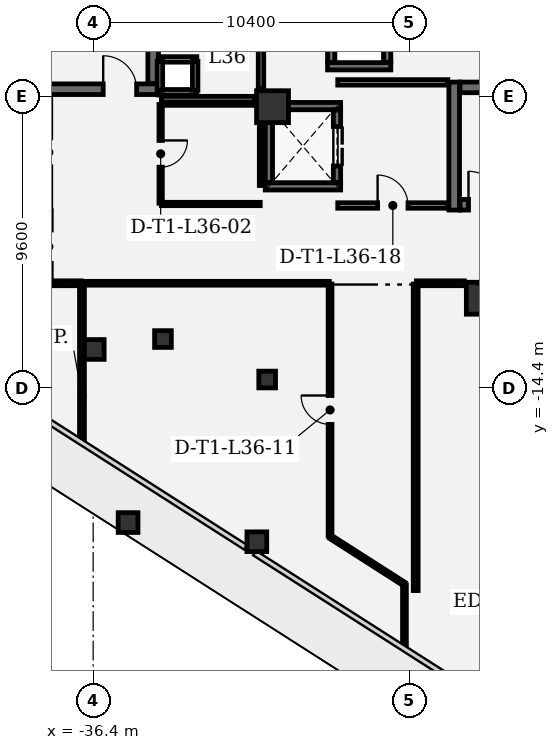
"""IFC4 building model, lengths in metres.
Left out: names, types, materials, properties, quantities, classifications, styles, units other than length and angle.
Written with IfcOpenShell. Run it as: python <this file> out.ifc"""

import sys

from ifc_helpers import new_model, si_unit, direction, frame, frame_2d, origin, origin_2d, place, context, subcontext, project, spatial, rectangle, extrude, element, fill, save


model = new_model("IFC4")
c1 = context("Model", 3, precision=1e-05, world=origin(), true_north=direction((0.0, 1.0)))
c2 = subcontext(c1, "Body", "Model", "MODEL_VIEW")
j1 = project(units=[si_unit("LENGTHUNIT", "METRE"), si_unit("PLANEANGLEUNIT", "RADIAN")], contexts=[c1])
p1 = place(None, origin())
s1 = spatial("IfcSite", under=j1, at=p1, CompositionType="ELEMENT")
p2 = place(p1, origin())
s2 = spatial("IfcBuilding", under=s1, at=p2, CompositionType="ELEMENT")
p3 = place(p2, frame((0.0, 0.0, 158.4)))
s3 = spatial("IfcBuildingStorey", under=s2, at=p3, CompositionType="ELEMENT", Elevation=158.4)
for number, where, z_axis, x_axis in (
    (1, (-23.6, -11.45, 0.0), (0.0, 0.0, 1.0), (1.0, 0.0, 0.0)),
    (2, (-30.5, -5.15, 0.0), (0.0, 0.0, 1.0), (1.0, 0.0, 0.0)),
):
    element("IfcColumn", number, at=place(p3, frame(where, z_axis=z_axis, x_axis=x_axis)), inside=s3, PredefinedType="COLUMN", context=c2, shape_type="SweptSolid", body=[
        extrude(rectangle(XDim=1.05, YDim=1.05, at=origin_2d()), origin(), (0.0, 0.0, 1.0), 4.05),
    ])
for number, where, z_axis, x_axis in (
    (3, (-35.252, -18.829, 0.0), (0.0, 0.0, 1.0), (1.0, 0.0, 0.0)),
    (4, (-31.016, -19.46, 0.0), (0.0, 0.0, 1.0), (1.0, 0.0, 0.0)),
    (5, (-36.365, -13.135, 0.0), (0.0, 0.0, 1.0), (1.0, 0.0, 0.0)),
):
    element("IfcColumn", number, at=place(p3, frame(where, z_axis=z_axis, x_axis=x_axis)), inside=s3, PredefinedType="COLUMN", context=c2, shape_type="SweptSolid", body=[
        extrude(rectangle(XDim=0.65, YDim=0.65, at=origin_2d()), origin(), (0.0, 0.0, 1.0), 4.05),
    ])
for number, where, z_axis, x_axis in (
    (6, (-34.104, -12.792, 0.0), (0.0, 0.0, 1.0), (1.0, 0.0, 0.0)),
    (7, (-30.677, -14.124, 0.0), (0.0, 0.0, 1.0), (1.0, 0.0, 0.0)),
):
    element("IfcColumn", number, at=place(p3, frame(where, z_axis=z_axis, x_axis=x_axis)), inside=s3, PredefinedType="COLUMN", context=c2, shape_type="SweptSolid", body=[
        extrude(rectangle(XDim=0.55, YDim=0.55, at=origin_2d()), origin(), (0.0, 0.0, 1.0), 4.05),
    ])
p4 = place(p3, frame((-24.525, -4.34, 0.0), z_axis=(0.0, 0.0, 1.0), x_axis=(0.0, -1.0, 0.0)))
e8 = element("IfcWall", 8, at=p4, inside=s3, PredefinedType="SHEAR", context=c2, shape_type="SweptSolid", body=[
    extrude(rectangle(XDim=4.21, YDim=0.35, at=frame_2d((2.105, 0.0))), origin(), (0.0, 0.0, 1.0), 3.78),
])
p5 = place(p3, frame((-24.335, -8.375, 0.0), z_axis=(0.0, 0.0, 1.0), x_axis=(1.0, 0.0, 0.0)))
e9 = element("IfcWall", 9, at=p5, inside=s3, PredefinedType="SHEAR", context=c2, shape_type="SweptSolid", body=[
    extrude(rectangle(XDim=8.12, YDim=0.35, at=frame_2d((4.06, 0.0))), origin(), (0.0, 0.0, 1.0), 3.78),
])
p6 = place(p5, frame((0.28, 0.0, 0.0)))
e10 = element("IfcOpeningElement", 10, at=p6, cuts=e9, PredefinedType="OPENING", context=c2, shape_type="SweptSolid", body=[
    extrude(rectangle(XDim=1.1, YDim=2.2, at=frame_2d((0.55, 1.1))), frame((0.0, 0.185, 0.0), z_axis=(0.0, -1.0, 0.0), x_axis=(1.0, 0.0, 0.0)), (0.0, 0.0, 1.0), 0.37),
])
p7 = place(p3, frame((-16.215, -4.515, 0.0), z_axis=(0.0, 0.0, 1.0), x_axis=(-1.0, 0.0, 0.0)))
e11 = element("IfcWall", 11, at=p7, inside=s3, PredefinedType="SHEAR", context=c2, shape_type="SweptSolid", body=[
    extrude(rectangle(XDim=8.12, YDim=0.35, at=frame_2d((4.06, 0.0))), origin(), (0.0, 0.0, 1.0), 3.78),
])
p8 = place(p3, frame((-38.46, -4.575, 0.0), z_axis=(0.0, 0.0, 1.0), x_axis=(1.0, 0.0, 0.0)))
e12 = element("IfcWall", 12, at=p8, inside=s3, PredefinedType="SHEAR", context=c2, shape_type="SweptSolid", body=[
    extrude(rectangle(XDim=4.21, YDim=0.35, at=frame_2d((2.105, 0.0))), origin(), (0.0, 0.0, 1.0), 3.78),
])
p9 = place(p8, frame((2.39, 0.0, 0.0)))
e13 = element("IfcOpeningElement", 13, at=p9, cuts=e12, PredefinedType="OPENING", context=c2, shape_type="SweptSolid", body=[
    extrude(rectangle(XDim=1.1, YDim=2.2, at=frame_2d((0.55, 1.1))), frame((0.0, 0.185, 0.0), z_axis=(0.0, -1.0, 0.0), x_axis=(1.0, 0.0, 0.0)), (0.0, 0.0, 1.0), 0.37),
])
p10 = place(p3, frame((-34.425, -4.385, 0.0), z_axis=(0.0, 0.0, 1.0), x_axis=(0.0, 1.0, 0.0)))
e14 = element("IfcWall", 14, at=p10, inside=s3, PredefinedType="SHEAR", context=c2, shape_type="SweptSolid", body=[
    extrude(rectangle(XDim=8.77, YDim=0.35, at=frame_2d((4.385, 0.0))), origin(), (0.0, 0.0, 1.0), 3.78),
])
for number, where, z_axis, x_axis in (
    (15, (-28.26, -7.77, 0.0), (0.0, 0.0, 1.0), (-1.0, 0.0, 0.0)),
    (16, (-30.74, -5.13, 0.0), (0.0, 0.0, 1.0), (1.0, 0.0, 0.0)),
):
    element("IfcWall", number, at=place(p3, frame(where, z_axis=z_axis, x_axis=x_axis)), inside=s3, PredefinedType="SHEAR", context=c2, shape_type="SweptSolid", body=[
        extrude(rectangle(XDim=2.48, YDim=0.24, at=frame_2d((1.24, 0.0))), origin(), (0.0, 0.0, 1.0), 3.78),
    ])
p11 = place(p3, frame((-30.62, -7.638, 0.0), z_axis=(0.0, 0.0, 1.0), x_axis=(0.0, 1.0, 0.0)))
e17 = element("IfcWall", 17, at=p11, inside=s3, PredefinedType="SHEAR", context=c2, shape_type="SweptSolid", body=[
    extrude(rectangle(XDim=2.376, YDim=0.24, at=frame_2d((1.188, 0.0))), origin(), (0.0, 0.0, 1.0), 3.78),
])
p12 = place(p3, frame((-28.38, -5.262, 0.0), z_axis=(0.0, 0.0, 1.0), x_axis=(0.0, -1.0, 0.0)))
e18 = element("IfcWall", 18, at=p12, inside=s3, PredefinedType="SHEAR", context=c2, shape_type="SweptSolid", body=[
    extrude(rectangle(XDim=2.376, YDim=0.24, at=frame_2d((1.188, 0.0))), origin(), (0.0, 0.0, 1.0), 3.78),
])
p13 = place(p12, frame((0.538, 0.0, 0.0)))
e19 = element("IfcOpeningElement", 19, at=p13, cuts=e18, PredefinedType="OPENING", context=c2, shape_type="SweptSolid", body=[
    extrude(rectangle(XDim=1.3, YDim=2.3, at=frame_2d((0.65, 1.15))), frame((0.0, 0.13, 0.0), z_axis=(0.0, -1.0, 0.0), x_axis=(1.0, 0.0, 0.0)), (0.0, 0.0, 1.0), 0.26),
])
p14 = place(p3, frame((-26.61, -3.82, 0.0), z_axis=(0.0, 0.0, 1.0), x_axis=(-1.0, 0.0, 0.0)))
e20 = element("IfcWall", 20, at=p14, inside=s3, PredefinedType="SHEAR", context=c2, shape_type="SweptSolid", body=[
    extrude(rectangle(XDim=2.08, YDim=0.24, at=frame_2d((1.04, 0.0))), origin(), (0.0, 0.0, 1.0), 3.78),
])
for number, where, z_axis, x_axis in (
    (21, (-28.57, -3.688, 0.0), (0.0, 0.0, 1.0), (0.0, 1.0, 0.0)),
    (22, (-26.73, -1.562, 0.0), (0.0, 0.0, 1.0), (0.0, -1.0, 0.0)),
):
    element("IfcWall", number, at=place(p3, frame(where, z_axis=z_axis, x_axis=x_axis)), inside=s3, PredefinedType="SHEAR", context=c2, shape_type="SweptSolid", body=[
        extrude(rectangle(XDim=2.126, YDim=0.24, at=frame_2d((1.063, 0.0))), origin(), (0.0, 0.0, 1.0), 3.78),
    ])
for number, where, z_axis, x_axis in (
    (23, (-32.99, -4.675, 0.0), (0.0, 0.0, 1.0), (-1.0, 0.0, 0.0)),
    (24, (-34.26, -3.595, 0.0), (0.0, 0.0, 1.0), (1.0, 0.0, 0.0)),
):
    element("IfcWall", number, at=place(p3, frame(where, z_axis=z_axis, x_axis=x_axis)), inside=s3, PredefinedType="PARTITIONING", context=c2, shape_type="SweptSolid", body=[
        extrude(rectangle(XDim=1.27, YDim=0.18, at=frame_2d((0.635, 0.0))), origin(), (0.0, 0.0, 1.0), 3.78),
    ])
for number, where, z_axis, x_axis in (
    (25, (-34.205, -4.61, 0.0), (0.0, 0.0, 1.0), (0.0, 1.0, 0.0)),
    (26, (-33.045, -3.66, 0.0), (0.0, 0.0, 1.0), (0.0, -1.0, 0.0)),
):
    element("IfcWall", number, at=place(p3, frame(where, z_axis=z_axis, x_axis=x_axis)), inside=s3, PredefinedType="PARTITIONING", context=c2, shape_type="SweptSolid", body=[
        extrude(rectangle(XDim=0.95, YDim=0.18, at=frame_2d((0.475, 0.0))), origin(), (0.0, 0.0, 1.0), 3.78),
    ])
p15 = place(p3, frame((-28.355, -8.4, 0.0), z_axis=(0.0, 0.0, 1.0), x_axis=(1.0, 0.0, 0.0)))
e27 = element("IfcWall", 27, at=p15, inside=s3, PredefinedType="PARTITIONING", context=c2, shape_type="SweptSolid", body=[
    extrude(rectangle(XDim=3.622, YDim=0.18, at=frame_2d((1.811, 0.0))), origin(), (0.0, 0.0, 1.0), 3.78),
])
p16 = place(p15, frame((1.311, 0.0, 0.0)))
e28 = element("IfcOpeningElement", 28, at=p16, cuts=e27, PredefinedType="OPENING", context=c2, shape_type="SweptSolid", body=[
    extrude(rectangle(XDim=1.0, YDim=2.15, at=frame_2d((0.5, 1.075))), frame((0.0, 0.1, 0.0), z_axis=(0.0, -1.0, 0.0), x_axis=(1.0, 0.0, 0.0)), (0.0, 0.0, 1.0), 0.2),
])
p17 = place(p3, frame((-24.733, -4.35, 0.0), z_axis=(0.0, 0.0, 1.0), x_axis=(-1.0, 0.0, 0.0)))
e29 = element("IfcWall", 29, at=p17, inside=s3, PredefinedType="PARTITIONING", context=c2, shape_type="SweptSolid", body=[
    extrude(rectangle(XDim=3.622, YDim=0.18, at=frame_2d((1.811, 0.0))), origin(), (0.0, 0.0, 1.0), 3.78),
])
p18 = place(p3, frame((-34.155, -8.35, 0.0), z_axis=(0.0, 0.0, 1.0), x_axis=(1.0, 0.0, 0.0)))
e30 = element("IfcWall", 30, at=p18, inside=s3, PredefinedType="PARTITIONING", context=c2, shape_type="SweptSolid", body=[
    extrude(rectangle(XDim=3.25, YDim=0.11, at=frame_2d((1.625, 0.0))), origin(), (0.0, 0.0, 1.0), 3.78),
])
p19 = place(p3, frame((-30.88, -7.743, 0.0), z_axis=(0.0, 0.0, 1.0), x_axis=(0.0, 1.0, 0.0)))
e31 = element("IfcWall", 31, at=p19, inside=s3, PredefinedType="PARTITIONING", context=c2, shape_type="SweptSolid", body=[
    extrude(rectangle(XDim=2.003, YDim=0.11, at=frame_2d((1.001, 0.0))), origin(), (0.0, 0.0, 1.0), 3.78),
])
p20 = place(p3, frame((-31.09, -5.05, 0.0), z_axis=(0.0, 0.0, 1.0), x_axis=(-1.0, 0.0, 0.0)))
e32 = element("IfcWall", 32, at=p20, inside=s3, PredefinedType="PARTITIONING", context=c2, shape_type="SweptSolid", body=[
    extrude(rectangle(XDim=3.065, YDim=0.11, at=frame_2d((1.532, 0.0))), origin(), (0.0, 0.0, 1.0), 3.78),
])
p21 = place(p3, frame((-34.18, -5.075, 0.0), z_axis=(0.0, 0.0, 1.0), x_axis=(0.0, -1.0, 0.0)))
e33 = element("IfcWall", 33, at=p21, inside=s3, PredefinedType="PARTITIONING", context=c2, shape_type="SweptSolid", body=[
    extrude(rectangle(XDim=3.25, YDim=0.11, at=frame_2d((1.625, 0.0))), origin(), (0.0, 0.0, 1.0), 3.78),
])
p22 = place(p21, frame((1.185, 0.0, 0.0)))
e34 = element("IfcOpeningElement", 34, at=p22, cuts=e33, PredefinedType="OPENING", context=c2, shape_type="SweptSolid", body=[
    extrude(rectangle(XDim=0.88, YDim=2.1, at=frame_2d((0.44, 1.05))), frame((0.0, 0.065, 0.0), z_axis=(0.0, -1.0, 0.0), x_axis=(1.0, 0.0, 0.0)), (0.0, 0.0, 1.0), 0.13),
])
p23 = place(p3, frame((-34.155, -4.9, 0.0), z_axis=(0.0, 0.0, 1.0), x_axis=(1.0, 0.0, 0.0)))
e35 = element("IfcWall", 35, at=p23, inside=s3, PredefinedType="PARTITIONING", context=c2, shape_type="SweptSolid", body=[
    extrude(rectangle(XDim=3.065, YDim=0.18, at=frame_2d((1.532, 0.0))), origin(), (0.0, 0.0, 1.0), 3.78),
])
p24 = place(p3, frame((-30.88, -4.56, 0.0), z_axis=(0.0, 0.0, 1.0), x_axis=(0.0, 1.0, 0.0)))
e36 = element("IfcWall", 36, at=p24, inside=s3, PredefinedType="PARTITIONING", context=c2, shape_type="SweptSolid", body=[
    extrude(rectangle(XDim=2.935, YDim=0.18, at=frame_2d((1.468, 0.0))), origin(), (0.0, 0.0, 1.0), 3.78),
])
p25 = place(p3, frame((-36.768, -16.123, 0.0), z_axis=(0.0, 0.0, 1.0), x_axis=(0.0, 1.0, 0.0)))
e37 = element("IfcWall", 37, at=p25, inside=s3, PredefinedType="PARTITIONING", context=c2, shape_type="SweptSolid", body=[
    extrude(rectangle(XDim=5.14, YDim=0.16, at=frame_2d((2.57, 0.0))), origin(), (0.0, 0.0, 1.0), 3.78),
])
p26 = place(p3, frame((-36.793, -10.958, 0.0), z_axis=(0.0, 0.0, 1.0), x_axis=(-1.0, 0.0, 0.0)))
e38 = element("IfcWall", 38, at=p26, inside=s3, PredefinedType="PARTITIONING", context=c2, shape_type="SweptSolid", body=[
    extrude(rectangle(XDim=1.04, YDim=0.16, at=frame_2d((0.52, 0.0))), origin(), (0.0, 0.0, 1.0), 3.78),
])
p27 = place(p3, frame((-26.161, -22.902, 0.0), z_axis=(0.0, 0.0, 1.0), x_axis=(0.0, 1.0, 0.0)))
e39 = element("IfcWall", 39, at=p27, inside=s3, PredefinedType="PARTITIONING", context=c2, shape_type="SweptSolid", body=[
    extrude(rectangle(XDim=2.021, YDim=0.125, at=frame_2d((1.011, 0.0))), origin(), (0.0, 0.0, 1.0), 3.78),
])
p28 = place(p3, frame((-28.587, -19.305, 0.0), z_axis=(0.0, 0.0, 1.0), x_axis=(0.842581967006, -0.538568128352, 0.0)))
e40 = element("IfcWall", 40, at=p28, inside=s3, PredefinedType="PARTITIONING", context=c2, shape_type="SweptSolid", body=[
    extrude(rectangle(XDim=2.854, YDim=0.125, at=frame_2d((1.427, 0.0))), origin(), (0.0, 0.0, 1.0), 3.78),
])
p29 = place(p3, frame((-28.608, -19.267, 0.0), z_axis=(0.0, 0.0, 1.0), x_axis=(0.0, 1.0, 0.0)))
e41 = element("IfcWall", 41, at=p29, inside=s3, PredefinedType="PARTITIONING", context=c2, shape_type="SweptSolid", body=[
    extrude(rectangle(XDim=8.284, YDim=0.125, at=frame_2d((4.142, 0.0))), origin(), (0.0, 0.0, 1.0), 3.78),
])
p30 = place(p29, frame((3.667, 0.0, 0.0)))
e42 = element("IfcOpeningElement", 42, at=p30, cuts=e41, PredefinedType="OPENING", context=c2, shape_type="SweptSolid", body=[
    extrude(rectangle(XDim=0.95, YDim=2.15, at=frame_2d((0.475, 1.075))), frame((0.0, 0.073, 0.0), z_axis=(0.0, -1.0, 0.0), x_axis=(1.0, 0.0, 0.0)), (0.0, 0.0, 1.0), 0.145),
])
p31 = place(p3, frame((-28.633, -10.958, 0.0), z_axis=(0.0, 0.0, 1.0), x_axis=(-1.0, 0.0, 0.0)))
e43 = element("IfcWall", 43, at=p31, inside=s3, PredefinedType="PARTITIONING", context=c2, shape_type="SweptSolid", body=[
    extrude(rectangle(XDim=8.102, YDim=0.125, at=frame_2d((4.051, 0.0))), origin(), (0.0, 0.0, 1.0), 3.344),
])
p32 = place(p3, frame((-24.19, -10.958, 0.0), z_axis=(0.0, 0.0, 1.0), x_axis=(-1.0, 0.0, 0.0)))
e44 = element("IfcWall", 44, at=p32, inside=s3, PredefinedType="PARTITIONING", context=c2, shape_type="SweptSolid", body=[
    extrude(rectangle(XDim=1.577, YDim=0.16, at=frame_2d((0.789, 0.0))), origin(), (0.0, 0.0, 1.0), 3.78),
])
p33 = place(p3, frame((-25.792, -10.983, 0.0), z_axis=(0.0, 0.0, 1.0), x_axis=(0.0, -1.0, 0.0)))
e45 = element("IfcWall", 45, at=p33, inside=s3, PredefinedType="PARTITIONING", context=c2, shape_type="SweptSolid", body=[
    extrude(rectangle(XDim=10.083, YDim=0.16, at=frame_2d((5.042, 0.0))), origin(), (0.0, 0.0, 1.0), 3.78),
])
p34 = place(p6, origin())
e46 = element("IfcDoor", 46, at=p34, inside=s3, OperationType="SINGLE_SWING_LEFT", PredefinedType="DOOR", context=c2, shape_type="SweptSolid", body=[
    extrude(rectangle(XDim=1.1, YDim=2.2, at=frame_2d((0.55, 1.1))), frame((0.0, 0.025, 0.0), z_axis=(0.0, -1.0, 0.0), x_axis=(1.0, 0.0, 0.0)), (0.0, 0.0, 1.0), 0.05),
])
fill(e10, e46)
p35 = place(p9, origin())
e47 = element("IfcDoor", 47, at=p35, inside=s3, OperationType="SINGLE_SWING_LEFT", PredefinedType="DOOR", context=c2, shape_type="SweptSolid", body=[
    extrude(rectangle(XDim=1.1, YDim=2.2, at=frame_2d((0.55, 1.1))), frame((0.0, 0.025, 0.0), z_axis=(0.0, -1.0, 0.0), x_axis=(1.0, 0.0, 0.0)), (0.0, 0.0, 1.0), 0.05),
])
fill(e13, e47)
p36 = place(p13, origin())
e48 = element("IfcDoor", 48, at=p36, inside=s3, OperationType="DOUBLE_DOOR_SLIDING", PredefinedType="DOOR", context=c2, shape_type="SweptSolid", body=[
    extrude(rectangle(XDim=1.3, YDim=2.3, at=frame_2d((0.65, 1.15))), frame((0.0, 0.025, 0.0), z_axis=(0.0, -1.0, 0.0), x_axis=(1.0, 0.0, 0.0)), (0.0, 0.0, 1.0), 0.05),
])
fill(e19, e48)
p37 = place(p22, origin())
e49 = element("IfcDoor", 49, at=p37, inside=s3, OperationType="SINGLE_SWING_LEFT", PredefinedType="DOOR", context=c2, shape_type="SweptSolid", body=[
    extrude(rectangle(XDim=0.88, YDim=2.1, at=frame_2d((0.44, 1.05))), frame((0.0, 0.025, 0.0), z_axis=(0.0, -1.0, 0.0), x_axis=(1.0, 0.0, 0.0)), (0.0, 0.0, 1.0), 0.05),
])
fill(e34, e49)
p38 = place(p30, origin())
e50 = element("IfcDoor", 50, at=p38, inside=s3, OperationType="SINGLE_SWING_RIGHT", PredefinedType="DOOR", context=c2, shape_type="SweptSolid", body=[
    extrude(rectangle(XDim=0.95, YDim=2.15, at=frame_2d((0.475, 1.075))), frame((0.0, 0.025, 0.0), z_axis=(0.0, -1.0, 0.0), x_axis=(1.0, 0.0, 0.0)), (0.0, 0.0, 1.0), 0.05),
])
fill(e42, e50)
p39 = place(p16, origin())
e51 = element("IfcDoor", 51, at=p39, inside=s3, OperationType="SINGLE_SWING_LEFT", PredefinedType="DOOR", context=c2, shape_type="SweptSolid", body=[
    extrude(rectangle(XDim=1.0, YDim=2.15, at=frame_2d((0.5, 1.075))), frame((0.0, 0.025, 0.0), z_axis=(0.0, -1.0, 0.0), x_axis=(1.0, 0.0, 0.0)), (0.0, 0.0, 1.0), 0.05),
])
fill(e28, e51)
save(model, sys.argv[1])
